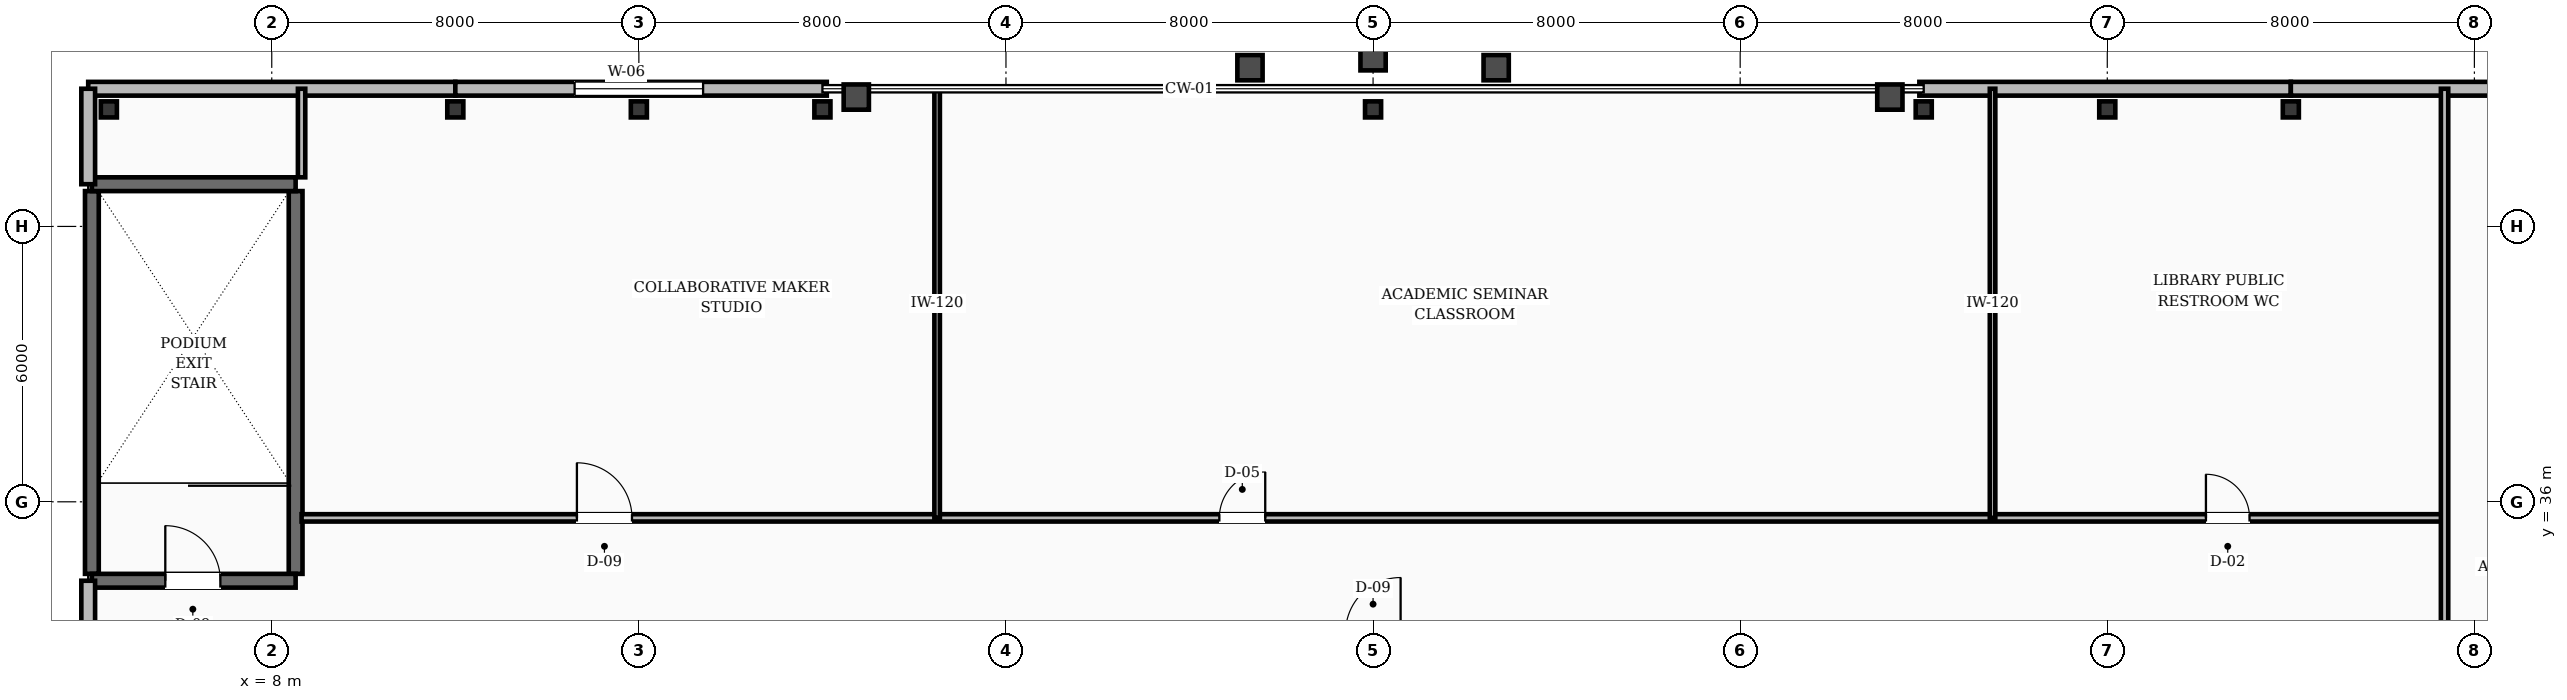
"""IFC4 building model, lengths in metres.
Left out: names, types, materials, properties, quantities, classifications, styles, units other than length and angle.
Written with IfcOpenShell. Run it as: python <this file> out.ifc"""

import sys

from ifc_helpers import new_model, si_unit, direction, frame, frame_2d, origin, origin_2d, place, context, subcontext, project, spatial, rectangle, hollow_rectangle, i_section, extrude, element, fill, save


model = new_model("IFC4")
c1 = context("Model", 3, precision=1e-05, world=origin(), true_north=direction((0.0, 1.0)))
c2 = subcontext(c1, "Body", "Model", "MODEL_VIEW")
j1 = project(units=[si_unit("LENGTHUNIT", "METRE"), si_unit("PLANEANGLEUNIT", "RADIAN")], contexts=[c1])
p1 = place(None, origin())
s1 = spatial("IfcSite", under=j1, at=p1, CompositionType="ELEMENT")
p2 = place(p1, origin())
s2 = spatial("IfcBuilding", under=s1, at=p2, CompositionType="ELEMENT")
p3 = place(p2, frame((0.0, 0.0, 19.6)))
s3 = spatial("IfcBuildingStorey", under=s2, at=p3, CompositionType="ELEMENT", Elevation=19.6)
for number, where, z_axis, x_axis in (
    (1, (4.08, 34.43, 0.0), (0.0, 0.0, 1.0), (0.0, 1.0, 0.0)),
    (2, (8.52, 34.43, 0.0), (0.0, 0.0, 1.0), (0.0, 1.0, 0.0)),
):
    element("IfcWall", number, at=place(p3, frame(where, z_axis=z_axis, x_axis=x_axis)), inside=s3, PredefinedType="SHEAR", context=c2, shape_type="SweptSolid", body=[
        extrude(rectangle(XDim=8.34, YDim=0.3, at=frame_2d((4.17, 0.0))), origin(), (0.0, 0.0, 1.0), 4.8),
    ])
p4 = place(p3, frame((4.08, 34.28, 0.0), z_axis=(0.0, 0.0, 1.0), x_axis=(1.0, 0.0, 0.0)))
e3 = element("IfcWall", 3, at=p4, inside=s3, PredefinedType="SHEAR", context=c2, shape_type="SweptSolid", body=[
    extrude(rectangle(XDim=4.44, YDim=0.3, at=frame_2d((2.22, 0.0))), origin(), (0.0, 0.0, 1.0), 4.8),
])
p5 = place(p4, frame((1.6, 0.0, 0.0)))
e4 = element("IfcOpeningElement", 4, at=p5, cuts=e3, PredefinedType="OPENING", context=c2, shape_type="SweptSolid", body=[
    extrude(rectangle(XDim=1.2, YDim=2.1, at=frame_2d((0.6, 1.05))), frame((0.0, 0.16, 0.0), z_axis=(0.0, -1.0, 0.0), x_axis=(1.0, 0.0, 0.0)), (0.0, 0.0, 1.0), 0.32),
])
p6 = place(p3, frame((4.08, 42.92, 0.0), z_axis=(0.0, 0.0, 1.0), x_axis=(1.0, 0.0, 0.0)))
e5 = element("IfcWall", 5, at=p6, inside=s3, PredefinedType="SHEAR", context=c2, shape_type="SweptSolid", body=[
    extrude(rectangle(XDim=4.44, YDim=0.3, at=frame_2d((2.22, 0.0))), origin(), (0.0, 0.0, 1.0), 4.8),
])
for number, where, z_axis, x_axis in (
    (6, (4.45, 44.55, 0.0), (0.0, 0.0, 1.0), (1.0, 0.0, 0.0)),
    (7, (12.0, 44.55, 0.0), (0.0, 0.0, 1.0), (1.0, 0.0, 0.0)),
    (8, (20.0, 44.55, 0.0), (0.0, 0.0, 1.0), (1.0, 0.0, 0.0)),
    (9, (32.0, 44.55, 0.0), (0.0, 0.0, 1.0), (1.0, 0.0, 0.0)),
    (10, (44.0, 44.55, 0.0), (0.0, 0.0, 1.0), (1.0, 0.0, 0.0)),
    (11, (52.0, 44.55, 0.0), (0.0, 0.0, 1.0), (1.0, 0.0, 0.0)),
):
    element("IfcColumn", number, at=place(p3, frame(where, z_axis=z_axis, x_axis=x_axis)), inside=s3, PredefinedType="COLUMN", context=c2, shape_type="SweptSolid", body=[
        extrude(i_section(OverallWidth=0.35, OverallDepth=0.35, WebThickness=0.012, FlangeThickness=0.019, FilletRadius=0.016, at=origin_2d()), origin(), (0.0, 0.0, 1.0), 4.8),
    ])
for number, where, z_axis, x_axis in (
    (12, (16.0, 44.55, 0.0), (0.0, 0.0, 1.0), (1.0, 0.0, 0.0)),
    (13, (48.0, 44.55, 0.0), (0.0, 0.0, 1.0), (1.0, 0.0, 0.0)),
):
    element("IfcColumn", number, at=place(p3, frame(where, z_axis=z_axis, x_axis=x_axis)), inside=s3, PredefinedType="PILASTER", context=c2, shape_type="SweptSolid", body=[
        extrude(hollow_rectangle(XDim=0.35, YDim=0.35, WallThickness=0.016, at=origin_2d()), origin(), (0.0, 0.0, 1.0), 4.8),
    ])
p7 = place(p3, frame((12.0, 45.0, 0.0), z_axis=(0.0, 0.0, 1.0), x_axis=(-1.0, 0.0, 0.0)))
e14 = element("IfcWall", 14, at=p7, inside=s3, PredefinedType="STANDARD", context=c2, shape_type="SweptSolid", body=[
    extrude(rectangle(XDim=8.0, YDim=0.3, at=frame_2d((4.0, 0.0))), origin(), (0.0, 0.0, 1.0), 3.47),
])
p8 = place(p3, frame((20.095, 45.0, 0.0), z_axis=(0.0, 0.0, 1.0), x_axis=(-1.0, 0.0, 0.0)))
e15 = element("IfcWall", 15, at=p8, inside=s3, PredefinedType="STANDARD", context=c2, shape_type="SweptSolid", body=[
    extrude(rectangle(XDim=8.095, YDim=0.3, at=frame_2d((4.047, 0.0))), origin(), (0.0, 0.0, 1.0), 3.47),
])
p9 = place(p8, frame((2.695, 0.0, 0.85)))
e16 = element("IfcOpeningElement", 16, at=p9, cuts=e15, PredefinedType="OPENING", context=c2, shape_type="SweptSolid", body=[
    extrude(rectangle(XDim=2.8, YDim=2.3, at=frame_2d((1.4, 1.15))), frame((0.0, 0.16, 0.0), z_axis=(0.0, -1.0, 0.0), x_axis=(1.0, 0.0, 0.0)), (0.0, 0.0, 1.0), 0.32),
])
p10 = place(p3, frame((52.0, 45.0, 0.0), z_axis=(0.0, 0.0, 1.0), x_axis=(-1.0, 0.0, 0.0)))
e17 = element("IfcWall", 17, at=p10, inside=s3, PredefinedType="STANDARD", context=c2, shape_type="SweptSolid", body=[
    extrude(rectangle(XDim=8.095, YDim=0.3, at=frame_2d((4.047, 0.0))), origin(), (0.0, 0.0, 1.0), 3.47),
])
p11 = place(p3, frame((60.0, 45.0, 0.0), z_axis=(0.0, 0.0, 1.0), x_axis=(-1.0, 0.0, 0.0)))
e18 = element("IfcWall", 18, at=p11, inside=s3, PredefinedType="STANDARD", context=c2, shape_type="SweptSolid", body=[
    extrude(rectangle(XDim=8.0, YDim=0.3, at=frame_2d((4.0, 0.0))), origin(), (0.0, 0.0, 1.0), 3.47),
])
p12 = place(p3, frame((4.0, 34.28, 0.0), z_axis=(0.0, 0.0, 1.0), x_axis=(0.0, -1.0, 0.0)))
e19 = element("IfcWall", 19, at=p12, inside=s3, PredefinedType="STANDARD", context=c2, shape_type="SweptSolid", body=[
    extrude(rectangle(XDim=1.88, YDim=0.3, at=frame_2d((0.94, 0.0))), origin(), (0.0, 0.0, 1.0), 3.47),
])
p13 = place(p3, frame((4.0, 45.0, 0.0), z_axis=(0.0, 0.0, 1.0), x_axis=(0.0, -1.0, 0.0)))
e20 = element("IfcWall", 20, at=p13, inside=s3, PredefinedType="STANDARD", context=c2, shape_type="SweptSolid", body=[
    extrude(rectangle(XDim=2.08, YDim=0.3, at=frame_2d((1.04, 0.0))), origin(), (0.0, 0.0, 1.0), 3.47),
])
p14 = place(p3, frame((8.65, 35.65, 0.0), z_axis=(0.0, 0.0, 1.0), x_axis=(1.0, 0.0, 0.0)))
e21 = element("IfcWall", 21, at=p14, inside=s3, PredefinedType="SOLIDWALL", context=c2, shape_type="SweptSolid", body=[
    extrude(rectangle(XDim=46.7, YDim=0.16, at=frame_2d((23.35, 0.0))), origin(), (0.0, 0.0, 1.0), 3.42),
])
p15 = place(p14, frame((6.0, 0.0, 0.0)))
e22 = element("IfcOpeningElement", 22, at=p15, cuts=e21, PredefinedType="OPENING", context=c2, shape_type="SweptSolid", body=[
    extrude(rectangle(XDim=1.2, YDim=2.1, at=frame_2d((0.6, 1.05))), frame((0.0, 0.09, 0.0), z_axis=(0.0, -1.0, 0.0), x_axis=(1.0, 0.0, 0.0)), (0.0, 0.0, 1.0), 0.18),
])
p16 = place(p14, frame((20.0, 0.0, 0.0)))
e23 = element("IfcOpeningElement", 23, at=p16, cuts=e21, PredefinedType="OPENING", context=c2, shape_type="SweptSolid", body=[
    extrude(rectangle(XDim=1.0, YDim=2.1, at=frame_2d((0.5, 1.05))), frame((0.0, 0.09, 0.0), z_axis=(0.0, -1.0, 0.0), x_axis=(1.0, 0.0, 0.0)), (0.0, 0.0, 1.0), 0.18),
])
p17 = place(p14, frame((41.5, 0.0, 0.0)))
e24 = element("IfcOpeningElement", 24, at=p17, cuts=e21, PredefinedType="OPENING", context=c2, shape_type="SweptSolid", body=[
    extrude(rectangle(XDim=0.95, YDim=2.1, at=frame_2d((0.475, 1.05))), frame((0.0, 0.09, 0.0), z_axis=(0.0, -1.0, 0.0), x_axis=(1.0, 0.0, 0.0)), (0.0, 0.0, 1.0), 0.18),
])
p18 = place(p3, frame((55.35, 15.55, 0.0), z_axis=(0.0, 0.0, 1.0), x_axis=(0.0, 1.0, 0.0)))
e25 = element("IfcWall", 25, at=p18, inside=s3, PredefinedType="SOLIDWALL", context=c2, shape_type="SweptSolid", body=[
    extrude(rectangle(XDim=29.45, YDim=0.16, at=frame_2d((14.725, 0.0))), origin(), (0.0, 0.0, 1.0), 3.42),
])
p19 = place(p18, frame((8.0, 0.0, 0.0)))
e26 = element("IfcOpeningElement", 26, at=p19, cuts=e25, PredefinedType="OPENING", context=c2, shape_type="SweptSolid", body=[
    extrude(rectangle(XDim=1.0, YDim=2.1, at=frame_2d((0.5, 1.05))), frame((0.0, 0.09, 0.0), z_axis=(0.0, -1.0, 0.0), x_axis=(1.0, 0.0, 0.0)), (0.0, 0.0, 1.0), 0.18),
])
p20 = place(p3, frame((8.65, 43.07, 0.0), z_axis=(0.0, 0.0, 1.0), x_axis=(0.0, 1.0, 0.0)))
e27 = element("IfcWall", 27, at=p20, inside=s3, PredefinedType="SOLIDWALL", context=c2, shape_type="SweptSolid", body=[
    extrude(rectangle(XDim=1.93, YDim=0.16, at=frame_2d((0.965, 0.0))), origin(), (0.0, 0.0, 1.0), 3.42),
])
for number, where, z_axis, x_axis in (
    (28, (22.5, 35.65, 0.0), (0.0, 0.0, 1.0), (0.0, 1.0, 0.0)),
    (29, (45.5, 35.65, 0.0), (0.0, 0.0, 1.0), (0.0, 1.0, 0.0)),
):
    element("IfcWall", number, at=place(p3, frame(where, z_axis=z_axis, x_axis=x_axis)), inside=s3, PredefinedType="PARTITIONING", context=c2, shape_type="SweptSolid", body=[
        extrude(rectangle(XDim=9.35, YDim=0.12, at=frame_2d((4.675, 0.0))), origin(), (0.0, 0.0, 1.0), 3.42),
    ])
p21 = place(p9, origin())
e30 = element("IfcWindow", 30, at=p21, inside=s3, PartitioningType="SINGLE_PANEL", PredefinedType="WINDOW", context=c2, shape_type="SweptSolid", body=[
    extrude(rectangle(XDim=2.8, YDim=2.3, at=frame_2d((1.4, 1.15))), frame((0.0, 0.03, 0.0), z_axis=(0.0, -1.0, 0.0), x_axis=(1.0, 0.0, 0.0)), (0.0, 0.0, 1.0), 0.06),
])
fill(e16, e30)
p22 = place(p5, origin())
e31 = element("IfcDoor", 31, at=p22, inside=s3, OperationType="SINGLE_SWING_LEFT", PredefinedType="DOOR", context=c2, shape_type="SweptSolid", body=[
    extrude(rectangle(XDim=1.2, YDim=2.1, at=frame_2d((0.6, 1.05))), frame((0.0, 0.025, 0.0), z_axis=(0.0, -1.0, 0.0), x_axis=(1.0, 0.0, 0.0)), (0.0, 0.0, 1.0), 0.05),
])
fill(e4, e31)
p23 = place(p15, origin())
e32 = element("IfcDoor", 32, at=p23, inside=s3, OperationType="SINGLE_SWING_LEFT", PredefinedType="DOOR", context=c2, shape_type="SweptSolid", body=[
    extrude(rectangle(XDim=1.2, YDim=2.1, at=frame_2d((0.6, 1.05))), frame((0.0, 0.025, 0.0), z_axis=(0.0, -1.0, 0.0), x_axis=(1.0, 0.0, 0.0)), (0.0, 0.0, 1.0), 0.05),
])
fill(e22, e32)
p24 = place(p16, origin())
e33 = element("IfcDoor", 33, at=p24, inside=s3, OperationType="SINGLE_SWING_RIGHT", PredefinedType="DOOR", context=c2, shape_type="SweptSolid", body=[
    extrude(rectangle(XDim=1.0, YDim=2.1, at=frame_2d((0.5, 1.05))), frame((0.0, 0.025, 0.0), z_axis=(0.0, -1.0, 0.0), x_axis=(1.0, 0.0, 0.0)), (0.0, 0.0, 1.0), 0.05),
])
fill(e23, e33)
p25 = place(p17, origin())
e34 = element("IfcDoor", 34, at=p25, inside=s3, OperationType="SINGLE_SWING_LEFT", PredefinedType="DOOR", context=c2, shape_type="SweptSolid", body=[
    extrude(rectangle(XDim=0.95, YDim=2.1, at=frame_2d((0.475, 1.05))), frame((0.0, 0.025, 0.0), z_axis=(0.0, -1.0, 0.0), x_axis=(1.0, 0.0, 0.0)), (0.0, 0.0, 1.0), 0.05),
])
fill(e24, e34)
save(model, sys.argv[1])
